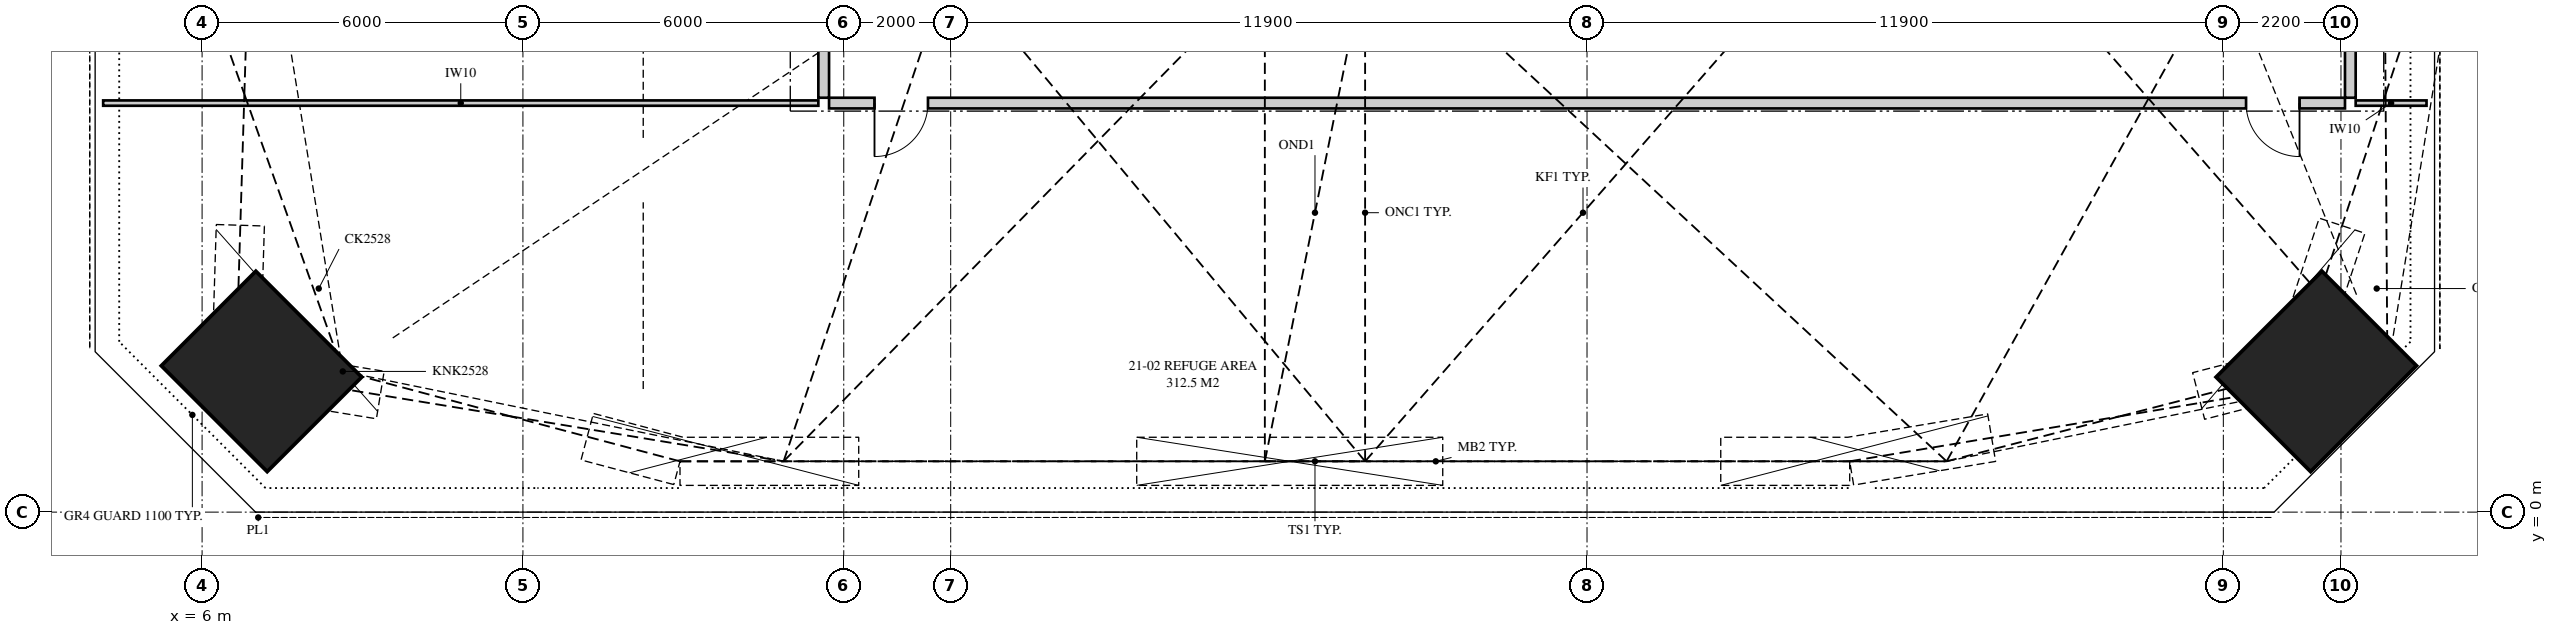
"""IFC4 building model, lengths in metres.
Left out: names, types, materials, properties, quantities, classifications, styles, units other than length and angle.
Written with IfcOpenShell. Run it as: python <this file> out.ifc"""

import sys

from ifc_helpers import new_model, si_unit, direction, frame, frame_2d, origin, origin_2d, place, context, subcontext, project, spatial, polyline, rectangle, hollow_rectangle, outline, extrude, element, fill, save


model = new_model("IFC4")
c1 = context("Model", 3, precision=1e-05, world=origin(), true_north=direction((0.0, 1.0)))
c2 = subcontext(c1, "Body", "Model", "MODEL_VIEW")
j1 = project(units=[si_unit("LENGTHUNIT", "METRE"), si_unit("PLANEANGLEUNIT", "RADIAN")], contexts=[c1])
p1 = place(None, origin())
s1 = spatial("IfcSite", under=j1, at=p1, CompositionType="ELEMENT")
p2 = place(p1, origin())
s2 = spatial("IfcBuilding", under=s1, at=p2, CompositionType="ELEMENT")
p3 = place(p2, frame((0.0, 0.0, 79.75)))
s3 = spatial("IfcBuildingStorey", under=s2, at=p3, CompositionType="ELEMENT", Elevation=79.75)
p4 = place(p3, frame((6.631, 2.631, 0.0), z_axis=(0.371390676354, 0.0, 0.928476690885), x_axis=(0.631748504238, 0.732827974204, -0.252699401695)))
e1 = element("IfcColumn", 1, at=p4, inside=s3, PredefinedType="COLUMN", context=c2, shape_type="SweptSolid", body=[
    extrude(hollow_rectangle(XDim=2.5, YDim=2.8, WallThickness=0.175, at=origin_2d()), origin(), (0.0, 0.0, 1.0), 4.635),
])
p5 = place(p3, frame((45.119, 2.631, 0.0), z_axis=(0.330350424728, 0.0, 0.943858356366), x_axis=(-0.647863070943, 0.727225506888, 0.22675207483)))
e2 = element("IfcColumn", 2, at=p5, inside=s3, PredefinedType="COLUMN", context=c2, shape_type="SweptSolid", body=[
    extrude(hollow_rectangle(XDim=2.5, YDim=2.8, WallThickness=0.25, at=origin_2d()), origin(), (0.0, 0.0, 1.0), 4.641),
])
p6 = place(p3, frame((17.725, 7.65, 0.0), z_axis=(0.0, 0.0, 1.0), x_axis=(1.0, 0.0, 0.0)))
e3 = element("IfcWall", 3, at=p6, inside=s3, PredefinedType="PARTITIONING", context=c2, shape_type="SweptSolid", body=[
    extrude(outline(polyline([(28.35, 0.0), (28.35, 4.72), (27.701, 4.72), (27.701, 3.22), (26.543, 3.22), (26.543, 4.72), (25.152, 4.72), (25.152, 4.141), (24.302, 4.141), (24.302, 4.72), (16.298, 4.72), (16.298, 4.141), (15.495, 4.141), (15.495, 4.72), (14.133, 4.72), (14.133, 4.141), (13.223, 4.141), (13.223, 4.72), (10.314, 4.72), (10.314, 4.194), (9.736, 4.194), (9.736, 4.72), (6.153, 4.72), (6.153, 4.141), (5.295, 4.141), (5.295, 4.72), (4.833, 4.72), (4.833, 4.141), (4.051, 4.141), (4.051, 4.72), (1.684, 4.72), (1.684, 4.141), (1.119, 4.141), (1.119, 4.72), (0.0, 4.72), (0.0, 0.0), (28.35, 0.0)]), holes=[polyline([(9.18, 3.208), (9.224, 3.323), (9.821, 3.385), (9.821, 2.858), (9.778, 2.743), (9.18, 2.68), (9.18, 3.208)])]), frame((0.0, 0.1, 0.0), z_axis=(0.0, -1.0, 0.0), x_axis=(1.0, 0.0, 0.0)), (0.0, 0.0, 1.0), 0.2),
])
p7 = place(p6, frame((0.85, 0.0, 0.0)))
e4 = element("IfcOpeningElement", 4, at=p7, cuts=e3, PredefinedType="OPENING", context=c2, shape_type="SweptSolid", body=[
    extrude(rectangle(XDim=1.0, YDim=2.1, at=frame_2d((0.5, 1.05))), frame((0.0, 0.11, 0.0), z_axis=(0.0, -1.0, 0.0), x_axis=(1.0, 0.0, 0.0)), (0.0, 0.0, 1.0), 0.22),
])
p8 = place(p6, frame((26.5, 0.0, 0.0)))
e5 = element("IfcOpeningElement", 5, at=p8, cuts=e3, PredefinedType="OPENING", context=c2, shape_type="SweptSolid", body=[
    extrude(rectangle(XDim=1.0, YDim=2.1, at=frame_2d((0.5, 1.05))), frame((0.0, 0.11, 0.0), z_axis=(0.0, -1.0, 0.0), x_axis=(1.0, 0.0, 0.0)), (0.0, 0.0, 1.0), 0.22),
])
p9 = place(p3, frame((17.625, 7.75, 0.0), z_axis=(0.0, 0.0, 1.0), x_axis=(0.0, 1.0, 0.0)))
e6 = element("IfcWall", 6, at=p9, inside=s3, PredefinedType="PARTITIONING", context=c2, shape_type="SweptSolid", body=[
    extrude(outline(polyline([(0.0, 0.0), (1.55, 0.0), (1.55, 3.22), (0.24, 3.22), (0.24, 4.72), (0.0, 4.72), (0.0, 0.0)])), frame((0.0, 0.1, 0.0), z_axis=(0.0, -1.0, 0.0), x_axis=(1.0, 0.0, 0.0)), (0.0, 0.0, 1.0), 0.2),
])
p10 = place(p3, frame((46.175, 7.75, 0.0), z_axis=(0.0, 0.0, 1.0), x_axis=(0.0, 1.0, 0.0)))
e7 = element("IfcWall", 7, at=p10, inside=s3, PredefinedType="PARTITIONING", context=c2, shape_type="SweptSolid", body=[
    extrude(rectangle(XDim=1.55, YDim=0.2, at=frame_2d((0.775, 0.0))), origin(), (0.0, 0.0, 1.0), 4.72),
])
p11 = place(p3, frame((4.15, 7.65, 0.0), z_axis=(0.0, 0.0, 1.0), x_axis=(1.0, 0.0, 0.0)))
e8 = element("IfcWall", 8, at=p11, inside=s3, PredefinedType="PARTITIONING", context=c2, shape_type="SweptSolid", body=[
    extrude(outline(polyline([(2.796, 4.72), (0.0, 4.72), (0.0, 0.0), (13.375, 0.0), (13.375, 4.72), (12.943, 4.72), (12.943, 3.22), (10.997, 3.22), (10.997, 4.12), (8.84, 4.12), (8.84, 4.72), (4.539, 4.72), (4.539, 2.9), (2.796, 2.9), (2.796, 4.72)]), holes=[polyline([(2.224, 1.047), (2.224, 1.936), (2.226, 1.973), (2.228, 1.991), (2.247, 1.991), (2.247, 2.03), (2.287, 2.081), (3.152, 2.205), (3.152, 1.32), (3.112, 1.269), (3.047, 1.26), (3.047, 1.114), (3.044, 1.059), (2.224, 1.047)])]), frame((0.0, 0.05, 0.0), z_axis=(0.0, -1.0, 0.0), x_axis=(1.0, 0.0, 0.0)), (0.0, 0.0, 1.0), 0.1),
])
p12 = place(p3, frame((46.275, 7.65, 0.0), z_axis=(0.0, 0.0, 1.0), x_axis=(1.0, 0.0, 0.0)))
e9 = element("IfcWall", 9, at=p12, inside=s3, PredefinedType="PARTITIONING", context=c2, shape_type="SweptSolid", body=[
    extrude(outline(polyline([(0.057, 0.998), (0.0, 0.998), (0.0, 0.0), (1.325, 0.0), (1.325, 2.9), (0.536, 2.9), (0.536, 4.72), (0.0, 4.72), (0.0, 1.977), (0.15, 1.977), (0.15, 2.091), (0.151, 2.146), (0.971, 2.148), (0.971, 1.26), (0.97, 1.236), (0.97, 1.205), (0.952, 1.204), (0.952, 1.166), (0.915, 1.115), (0.057, 0.998)])), frame((0.0, 0.05, 0.0), z_axis=(0.0, -1.0, 0.0), x_axis=(1.0, 0.0, 0.0)), (0.0, 0.0, 1.0), 0.1),
])
p13 = place(p7, frame((1.0, 0.0, 0.0), z_axis=(0.0, 0.0, 1.0), x_axis=(-1.0, 0.0, 0.0)))
e10 = element("IfcDoor", 10, at=p13, inside=s3, OperationType="SINGLE_SWING_RIGHT", PredefinedType="DOOR", context=c2, shape_type="SweptSolid", body=[
    extrude(rectangle(XDim=1.0, YDim=2.1, at=frame_2d((0.5, 1.05))), frame((0.0, 0.025, 0.0), z_axis=(0.0, -1.0, 0.0), x_axis=(1.0, 0.0, 0.0)), (0.0, 0.0, 1.0), 0.05),
])
fill(e4, e10)
p14 = place(p8, frame((1.0, 0.0, 0.0), z_axis=(0.0, 0.0, 1.0), x_axis=(-1.0, 0.0, 0.0)))
e11 = element("IfcDoor", 11, at=p14, inside=s3, OperationType="SINGLE_SWING_LEFT", PredefinedType="DOOR", context=c2, shape_type="SweptSolid", body=[
    extrude(rectangle(XDim=1.0, YDim=2.1, at=frame_2d((0.5, 1.05))), frame((0.0, 0.025, 0.0), z_axis=(0.0, -1.0, 0.0), x_axis=(1.0, 0.0, 0.0)), (0.0, 0.0, 1.0), 0.05),
])
fill(e5, e11)
save(model, sys.argv[1])
